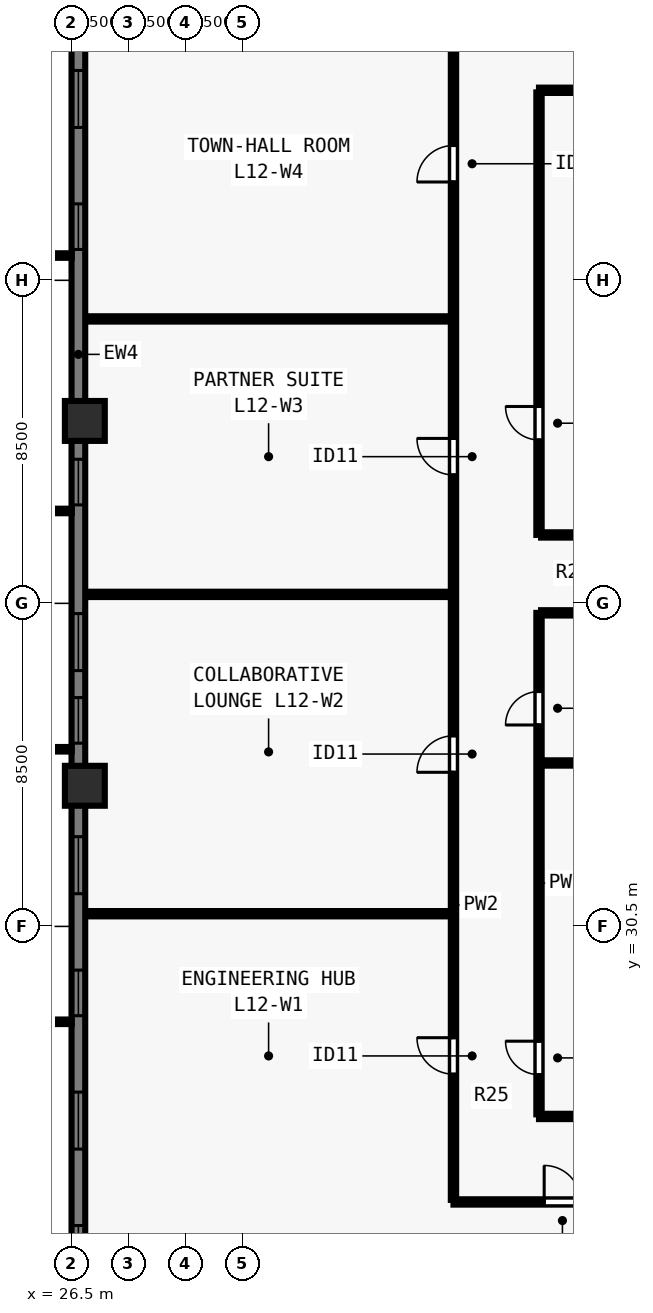
"""IFC4 building model, lengths in metres.
Left out: names, types, materials, properties, quantities, classifications, styles, units other than length and angle.
Written with IfcOpenShell. Run it as: python <this file> out.ifc"""

import sys

from ifc_helpers import new_model, si_unit, direction, frame, frame_2d, origin, origin_2d, place, context, subcontext, project, spatial, rectangle, extrude, element, fill, save


model = new_model("IFC4")
c1 = context("Model", 3, precision=1e-05, world=origin(), true_north=direction((0.0, 1.0)))
c2 = subcontext(c1, "Body", "Model", "MODEL_VIEW")
j1 = project(units=[si_unit("LENGTHUNIT", "METRE"), si_unit("PLANEANGLEUNIT", "RADIAN")], contexts=[c1])
p1 = place(None, origin())
s1 = spatial("IfcSite", under=j1, at=p1, CompositionType="ELEMENT")
p2 = place(p1, origin())
s2 = spatial("IfcBuilding", under=s1, at=p2, CompositionType="ELEMENT")
p3 = place(p2, frame((0.0, 0.0, 48.0)))
s3 = spatial("IfcBuildingStorey", under=s2, at=p3, CompositionType="ELEMENT", Elevation=48.0)
for number, where, z_axis, x_axis in (
    (1, (26.85, 43.8, 0.0), (0.0, 0.0, 1.0), (0.0, 1.0, 0.0)),
    (2, (26.85, 34.2, 0.0), (0.0, 0.0, 1.0), (0.0, 1.0, 0.0)),
):
    element("IfcColumn", number, at=place(p3, frame(where, z_axis=z_axis, x_axis=x_axis)), inside=s3, PredefinedType="COLUMN", context=c2, shape_type="SweptSolid", body=[
        extrude(rectangle(XDim=1.05, YDim=1.05, at=origin_2d()), origin(), (0.0, 0.0, 1.0), 3.5),
    ])
p4 = place(p3, frame((26.68, 16.5, 0.0), z_axis=(0.0, 0.0, 1.0), x_axis=(0.0, 1.0, 0.0)))
e3 = element("IfcWall", 3, at=p4, inside=s3, PredefinedType="SOLIDWALL", context=c2, shape_type="SweptSolid", body=[
    extrude(rectangle(XDim=44.662, YDim=0.36, at=frame_2d((22.331, 0.0))), origin(), (0.0, 0.0, 1.0), 3.28),
])
p5 = place(p4, frame((4.93, 0.0, 0.8)))
e4 = element("IfcOpeningElement", 4, at=p5, cuts=e3, PredefinedType="OPENING", context=c2, shape_type="SweptSolid", body=[
    extrude(rectangle(XDim=1.2, YDim=1.544, at=frame_2d((0.6, 0.772))), frame((0.0, 0.19, 0.0), z_axis=(0.0, -1.0, 0.0), x_axis=(1.0, 0.0, 0.0)), (0.0, 0.0, 1.0), 0.38),
])
p6 = place(p4, frame((8.14, 0.0, 0.8)))
e5 = element("IfcOpeningElement", 5, at=p6, cuts=e3, PredefinedType="OPENING", context=c2, shape_type="SweptSolid", body=[
    extrude(rectangle(XDim=1.5, YDim=1.544, at=frame_2d((0.75, 0.772))), frame((0.0, 0.19, 0.0), z_axis=(0.0, -1.0, 0.0), x_axis=(1.0, 0.0, 0.0)), (0.0, 0.0, 1.0), 0.38),
])
p7 = place(p4, frame((11.65, 0.0, 0.8)))
e6 = element("IfcOpeningElement", 6, at=p7, cuts=e3, PredefinedType="OPENING", context=c2, shape_type="SweptSolid", body=[
    extrude(rectangle(XDim=1.2, YDim=1.544, at=frame_2d((0.6, 0.772))), frame((0.0, 0.19, 0.0), z_axis=(0.0, -1.0, 0.0), x_axis=(1.0, 0.0, 0.0)), (0.0, 0.0, 1.0), 0.38),
])
p8 = place(p4, frame((14.861, 0.0, 0.8)))
e7 = element("IfcOpeningElement", 7, at=p8, cuts=e3, PredefinedType="OPENING", context=c2, shape_type="SweptSolid", body=[
    extrude(rectangle(XDim=1.5, YDim=1.544, at=frame_2d((0.75, 0.772))), frame((0.0, 0.19, 0.0), z_axis=(0.0, -1.0, 0.0), x_axis=(1.0, 0.0, 0.0)), (0.0, 0.0, 1.0), 0.38),
])
p9 = place(p4, frame((18.821, 0.0, 0.8)))
e8 = element("IfcOpeningElement", 8, at=p9, cuts=e3, PredefinedType="OPENING", context=c2, shape_type="SweptSolid", body=[
    extrude(rectangle(XDim=1.2, YDim=1.544, at=frame_2d((0.6, 0.772))), frame((0.0, 0.19, 0.0), z_axis=(0.0, -1.0, 0.0), x_axis=(1.0, 0.0, 0.0)), (0.0, 0.0, 1.0), 0.38),
])
p10 = place(p4, frame((20.731, 0.0, 0.8)))
e9 = element("IfcOpeningElement", 9, at=p10, cuts=e3, PredefinedType="OPENING", context=c2, shape_type="SweptSolid", body=[
    extrude(rectangle(XDim=1.5, YDim=1.544, at=frame_2d((0.75, 0.772))), frame((0.0, 0.19, 0.0), z_axis=(0.0, -1.0, 0.0), x_axis=(1.0, 0.0, 0.0)), (0.0, 0.0, 1.0), 0.38),
])
p11 = place(p4, frame((25.091, 0.0, 0.8)))
e10 = element("IfcOpeningElement", 10, at=p11, cuts=e3, PredefinedType="OPENING", context=c2, shape_type="SweptSolid", body=[
    extrude(rectangle(XDim=1.2, YDim=1.544, at=frame_2d((0.6, 0.772))), frame((0.0, 0.19, 0.0), z_axis=(0.0, -1.0, 0.0), x_axis=(1.0, 0.0, 0.0)), (0.0, 0.0, 1.0), 0.38),
])
p12 = place(p4, frame((31.812, 0.0, 0.8)))
e11 = element("IfcOpeningElement", 11, at=p12, cuts=e3, PredefinedType="OPENING", context=c2, shape_type="SweptSolid", body=[
    extrude(rectangle(XDim=1.2, YDim=1.544, at=frame_2d((0.6, 0.772))), frame((0.0, 0.19, 0.0), z_axis=(0.0, -1.0, 0.0), x_axis=(1.0, 0.0, 0.0)), (0.0, 0.0, 1.0), 0.38),
])
p13 = place(p4, frame((35.022, 0.0, 0.8)))
e12 = element("IfcOpeningElement", 12, at=p13, cuts=e3, PredefinedType="OPENING", context=c2, shape_type="SweptSolid", body=[
    extrude(rectangle(XDim=1.5, YDim=1.544, at=frame_2d((0.75, 0.772))), frame((0.0, 0.19, 0.0), z_axis=(0.0, -1.0, 0.0), x_axis=(1.0, 0.0, 0.0)), (0.0, 0.0, 1.0), 0.38),
])
p14 = place(p4, frame((38.532, 0.0, 0.8)))
e13 = element("IfcOpeningElement", 13, at=p14, cuts=e3, PredefinedType="OPENING", context=c2, shape_type="SweptSolid", body=[
    extrude(rectangle(XDim=1.2, YDim=1.544, at=frame_2d((0.6, 0.772))), frame((0.0, 0.19, 0.0), z_axis=(0.0, -1.0, 0.0), x_axis=(1.0, 0.0, 0.0)), (0.0, 0.0, 1.0), 0.38),
])
p15 = place(p3, frame((36.55, 23.25, 0.0), z_axis=(0.0, 0.0, 1.0), x_axis=(1.0, 0.0, 0.0)))
e14 = element("IfcWall", 14, at=p15, inside=s3, PredefinedType="PARTITIONING", context=c2, shape_type="SweptSolid", body=[
    extrude(rectangle(XDim=30.9, YDim=0.14, at=frame_2d((15.45, 0.0))), origin(), (0.0, 0.0, 1.0), 3.28),
])
p16 = place(p15, frame((2.386, 0.0, 0.0)))
e15 = element("IfcOpeningElement", 15, at=p16, cuts=e14, PredefinedType="OPENING", context=c2, shape_type="SweptSolid", body=[
    extrude(rectangle(XDim=0.96, YDim=2.12, at=frame_2d((0.48, 1.06))), frame((0.0, 0.08, 0.0), z_axis=(0.0, -1.0, 0.0), x_axis=(1.0, 0.0, 0.0)), (0.0, 0.0, 1.0), 0.16),
])
p17 = place(p15, frame((27.066, 0.0, 0.0)))
e16 = element("IfcOpeningElement", 16, at=p17, cuts=e14, PredefinedType="OPENING", context=c2, shape_type="SweptSolid", body=[
    extrude(rectangle(XDim=0.96, YDim=2.12, at=frame_2d((0.48, 1.06))), frame((0.0, 0.08, 0.0), z_axis=(0.0, -1.0, 0.0), x_axis=(1.0, 0.0, 0.0)), (0.0, 0.0, 1.0), 0.16),
])
p18 = place(p3, frame((36.55, 23.305, 0.0), z_axis=(0.0, 0.0, 1.0), x_axis=(0.0, 1.0, 0.0)))
e17 = element("IfcWall", 17, at=p18, inside=s3, PredefinedType="PARTITIONING", context=c2, shape_type="SweptSolid", body=[
    extrude(rectangle(XDim=31.39, YDim=0.14, at=frame_2d((15.695, 0.0))), origin(), (0.0, 0.0, 1.0), 3.28),
])
p19 = place(p18, frame((3.307, 0.0, 0.0)))
e18 = element("IfcOpeningElement", 18, at=p19, cuts=e17, PredefinedType="OPENING", context=c2, shape_type="SweptSolid", body=[
    extrude(rectangle(XDim=0.96, YDim=2.12, at=frame_2d((0.48, 1.06))), frame((0.0, 0.08, 0.0), z_axis=(0.0, -1.0, 0.0), x_axis=(1.0, 0.0, 0.0)), (0.0, 0.0, 1.0), 0.16),
])
p20 = place(p18, frame((11.25, 0.0, 0.0)))
e19 = element("IfcOpeningElement", 19, at=p20, cuts=e17, PredefinedType="OPENING", context=c2, shape_type="SweptSolid", body=[
    extrude(rectangle(XDim=0.96, YDim=2.12, at=frame_2d((0.48, 1.06))), frame((0.0, 0.08, 0.0), z_axis=(0.0, -1.0, 0.0), x_axis=(1.0, 0.0, 0.0)), (0.0, 0.0, 1.0), 0.16),
])
p21 = place(p18, frame((19.075, 0.0, 0.0)))
e20 = element("IfcOpeningElement", 20, at=p21, cuts=e17, PredefinedType="OPENING", context=c2, shape_type="SweptSolid", body=[
    extrude(rectangle(XDim=0.96, YDim=2.12, at=frame_2d((0.48, 1.06))), frame((0.0, 0.08, 0.0), z_axis=(0.0, -1.0, 0.0), x_axis=(1.0, 0.0, 0.0)), (0.0, 0.0, 1.0), 0.16),
])
p22 = place(p18, frame((26.782, 0.0, 0.0)))
e21 = element("IfcOpeningElement", 21, at=p22, cuts=e17, PredefinedType="OPENING", context=c2, shape_type="SweptSolid", body=[
    extrude(rectangle(XDim=0.96, YDim=2.12, at=frame_2d((0.48, 1.06))), frame((0.0, 0.08, 0.0), z_axis=(0.0, -1.0, 0.0), x_axis=(1.0, 0.0, 0.0)), (0.0, 0.0, 1.0), 0.16),
])
p23 = place(p3, frame((38.8, 25.5, 0.0), z_axis=(0.0, 0.0, 1.0), x_axis=(1.0, 0.0, 0.0)))
e22 = element("IfcWall", 22, at=p23, inside=s3, PredefinedType="PARTITIONING", context=c2, shape_type="SweptSolid", body=[
    extrude(rectangle(XDim=26.4, YDim=0.14, at=frame_2d((13.2, 0.0))), origin(), (0.0, 0.0, 1.0), 3.28),
])
p24 = place(p23, frame((1.2, 0.0, 0.0)))
e23 = element("IfcOpeningElement", 23, at=p24, cuts=e22, PredefinedType="OPENING", context=c2, shape_type="SweptSolid", body=[
    extrude(rectangle(XDim=0.88, YDim=2.1, at=frame_2d((0.44, 1.05))), frame((0.0, 0.08, 0.0), z_axis=(0.0, -1.0, 0.0), x_axis=(1.0, 0.0, 0.0)), (0.0, 0.0, 1.0), 0.16),
])
p25 = place(p23, frame((9.7, 0.0, 0.0)))
e24 = element("IfcOpeningElement", 24, at=p25, cuts=e22, PredefinedType="OPENING", context=c2, shape_type="SweptSolid", body=[
    extrude(rectangle(XDim=0.88, YDim=2.1, at=frame_2d((0.44, 1.05))), frame((0.0, 0.08, 0.0), z_axis=(0.0, -1.0, 0.0), x_axis=(1.0, 0.0, 0.0)), (0.0, 0.0, 1.0), 0.16),
])
p26 = place(p23, frame((20.2, 0.0, 0.0)))
e25 = element("IfcOpeningElement", 25, at=p26, cuts=e22, PredefinedType="OPENING", context=c2, shape_type="SweptSolid", body=[
    extrude(rectangle(XDim=0.88, YDim=2.1, at=frame_2d((0.44, 1.05))), frame((0.0, 0.08, 0.0), z_axis=(0.0, -1.0, 0.0), x_axis=(1.0, 0.0, 0.0)), (0.0, 0.0, 1.0), 0.16),
])
p27 = place(p3, frame((38.8, 52.5, 0.0), z_axis=(0.0, 0.0, 1.0), x_axis=(1.0, 0.0, 0.0)))
e26 = element("IfcWall", 26, at=p27, inside=s3, PredefinedType="PARTITIONING", context=c2, shape_type="SweptSolid", body=[
    extrude(rectangle(XDim=26.4, YDim=0.14, at=frame_2d((13.2, 0.0))), origin(), (0.0, 0.0, 1.0), 3.28),
])
p28 = place(p27, frame((2.2, 0.0, 0.0)))
e27 = element("IfcOpeningElement", 27, at=p28, cuts=e26, PredefinedType="OPENING", context=c2, shape_type="SweptSolid", body=[
    extrude(rectangle(XDim=0.88, YDim=2.1, at=frame_2d((0.44, 1.05))), frame((0.0, 0.08, 0.0), z_axis=(0.0, -1.0, 0.0), x_axis=(1.0, 0.0, 0.0)), (0.0, 0.0, 1.0), 0.16),
])
p29 = place(p27, frame((13.7, 0.0, 0.0)))
e28 = element("IfcOpeningElement", 28, at=p29, cuts=e26, PredefinedType="OPENING", context=c2, shape_type="SweptSolid", body=[
    extrude(rectangle(XDim=0.88, YDim=2.1, at=frame_2d((0.44, 1.05))), frame((0.0, 0.08, 0.0), z_axis=(0.0, -1.0, 0.0), x_axis=(1.0, 0.0, 0.0)), (0.0, 0.0, 1.0), 0.16),
])
p30 = place(p27, frame((23.2, 0.0, 0.0)))
e29 = element("IfcOpeningElement", 29, at=p30, cuts=e26, PredefinedType="OPENING", context=c2, shape_type="SweptSolid", body=[
    extrude(rectangle(XDim=0.88, YDim=2.1, at=frame_2d((0.44, 1.05))), frame((0.0, 0.08, 0.0), z_axis=(0.0, -1.0, 0.0), x_axis=(1.0, 0.0, 0.0)), (0.0, 0.0, 1.0), 0.16),
])
p31 = place(p3, frame((38.8, 25.555, 0.0), z_axis=(0.0, 0.0, 1.0), x_axis=(0.0, 1.0, 0.0)))
e30 = element("IfcWall", 30, at=p31, inside=s3, PredefinedType="PARTITIONING", context=c2, shape_type="SweptSolid", body=[
    extrude(rectangle(XDim=13.195, YDim=0.14, at=frame_2d((6.598, 0.0))), origin(), (0.0, 0.0, 1.0), 3.28),
])
p32 = place(p31, frame((1.045, 0.0, 0.0)))
e31 = element("IfcOpeningElement", 31, at=p32, cuts=e30, PredefinedType="OPENING", context=c2, shape_type="SweptSolid", body=[
    extrude(rectangle(XDim=0.88, YDim=2.1, at=frame_2d((0.44, 1.05))), frame((0.0, 0.08, 0.0), z_axis=(0.0, -1.0, 0.0), x_axis=(1.0, 0.0, 0.0)), (0.0, 0.0, 1.0), 0.16),
])
p33 = place(p31, frame((10.245, 0.0, 0.0)))
e32 = element("IfcOpeningElement", 32, at=p33, cuts=e30, PredefinedType="OPENING", context=c2, shape_type="SweptSolid", body=[
    extrude(rectangle(XDim=0.88, YDim=2.1, at=frame_2d((0.44, 1.05))), frame((0.0, 0.08, 0.0), z_axis=(0.0, -1.0, 0.0), x_axis=(1.0, 0.0, 0.0)), (0.0, 0.0, 1.0), 0.16),
])
p34 = place(p3, frame((38.8, 40.8, 0.0), z_axis=(0.0, 0.0, 1.0), x_axis=(0.0, 1.0, 0.0)))
e33 = element("IfcWall", 33, at=p34, inside=s3, PredefinedType="PARTITIONING", context=c2, shape_type="SweptSolid", body=[
    extrude(rectangle(XDim=11.645, YDim=0.14, at=frame_2d((5.823, 0.0))), origin(), (0.0, 0.0, 1.0), 3.28),
])
p35 = place(p34, frame((2.5, 0.0, 0.0)))
e34 = element("IfcOpeningElement", 34, at=p35, cuts=e33, PredefinedType="OPENING", context=c2, shape_type="SweptSolid", body=[
    extrude(rectangle(XDim=0.88, YDim=2.1, at=frame_2d((0.44, 1.05))), frame((0.0, 0.08, 0.0), z_axis=(0.0, -1.0, 0.0), x_axis=(1.0, 0.0, 0.0)), (0.0, 0.0, 1.0), 0.16),
])
for number, where, z_axis, x_axis in (
    (35, (38.855, 38.75, 0.0), (0.0, 0.0, 1.0), (1.0, 0.0, 0.0)),
    (36, (38.855, 40.8, 0.0), (0.0, 0.0, 1.0), (1.0, 0.0, 0.0)),
    (37, (38.855, 34.8, 0.0), (0.0, 0.0, 1.0), (1.0, 0.0, 0.0)),
):
    element("IfcWall", number, at=place(p3, frame(where, z_axis=z_axis, x_axis=x_axis)), inside=s3, PredefinedType="PARTITIONING", context=c2, shape_type="SweptSolid", body=[
        extrude(rectangle(XDim=4.385, YDim=0.14, at=frame_2d((2.192, 0.0))), origin(), (0.0, 0.0, 1.0), 3.28),
    ])
p36 = place(p3, frame((26.92, 30.834, 0.0), z_axis=(0.0, 0.0, 1.0), x_axis=(1.0, 0.0, 0.0)))
e38 = element("IfcWall", 38, at=p36, inside=s3, PredefinedType="PARTITIONING", context=c2, shape_type="SweptSolid", body=[
    extrude(rectangle(XDim=9.53, YDim=0.14, at=frame_2d((4.765, 0.0))), origin(), (0.0, 0.0, 1.0), 3.28),
])
p37 = place(p3, frame((26.92, 39.236, 0.0), z_axis=(0.0, 0.0, 1.0), x_axis=(1.0, 0.0, 0.0)))
e39 = element("IfcWall", 39, at=p37, inside=s3, PredefinedType="PARTITIONING", context=c2, shape_type="SweptSolid", body=[
    extrude(rectangle(XDim=9.53, YDim=0.14, at=frame_2d((4.765, 0.0))), origin(), (0.0, 0.0, 1.0), 2.849),
])
p38 = place(p3, frame((26.92, 46.484, 0.0), z_axis=(0.0, 0.0, 1.0), x_axis=(1.0, 0.0, 0.0)))
e40 = element("IfcWall", 40, at=p38, inside=s3, PredefinedType="PARTITIONING", context=c2, shape_type="SweptSolid", body=[
    extrude(rectangle(XDim=9.53, YDim=0.14, at=frame_2d((4.765, 0.0))), origin(), (0.0, 0.0, 1.0), 3.28),
])
p39 = place(p5, origin())
e41 = element("IfcWindow", 41, at=p39, inside=s3, PartitioningType="SINGLE_PANEL", PredefinedType="WINDOW", context=c2, shape_type="SweptSolid", body=[
    extrude(rectangle(XDim=1.2, YDim=1.544, at=frame_2d((0.6, 0.772))), frame((0.0, -0.05, 0.0), z_axis=(0.0, -1.0, 0.0), x_axis=(1.0, 0.0, 0.0)), (0.0, 0.0, 1.0), 0.06),
])
fill(e4, e41)
p40 = place(p6, origin())
e42 = element("IfcWindow", 42, at=p40, inside=s3, PartitioningType="SINGLE_PANEL", PredefinedType="WINDOW", context=c2, shape_type="SweptSolid", body=[
    extrude(rectangle(XDim=1.5, YDim=1.544, at=frame_2d((0.75, 0.772))), frame((0.0, -0.05, 0.0), z_axis=(0.0, -1.0, 0.0), x_axis=(1.0, 0.0, 0.0)), (0.0, 0.0, 1.0), 0.06),
])
fill(e5, e42)
p41 = place(p7, origin())
e43 = element("IfcWindow", 43, at=p41, inside=s3, PartitioningType="SINGLE_PANEL", PredefinedType="WINDOW", context=c2, shape_type="SweptSolid", body=[
    extrude(rectangle(XDim=1.2, YDim=1.544, at=frame_2d((0.6, 0.772))), frame((0.0, -0.05, 0.0), z_axis=(0.0, -1.0, 0.0), x_axis=(1.0, 0.0, 0.0)), (0.0, 0.0, 1.0), 0.06),
])
fill(e6, e43)
p42 = place(p8, origin())
e44 = element("IfcWindow", 44, at=p42, inside=s3, PartitioningType="SINGLE_PANEL", PredefinedType="WINDOW", context=c2, shape_type="SweptSolid", body=[
    extrude(rectangle(XDim=1.5, YDim=1.544, at=frame_2d((0.75, 0.772))), frame((0.0, -0.05, 0.0), z_axis=(0.0, -1.0, 0.0), x_axis=(1.0, 0.0, 0.0)), (0.0, 0.0, 1.0), 0.06),
])
fill(e7, e44)
p43 = place(p9, origin())
e45 = element("IfcWindow", 45, at=p43, inside=s3, PartitioningType="SINGLE_PANEL", PredefinedType="WINDOW", context=c2, shape_type="SweptSolid", body=[
    extrude(rectangle(XDim=1.2, YDim=1.544, at=frame_2d((0.6, 0.772))), frame((0.0, -0.05, 0.0), z_axis=(0.0, -1.0, 0.0), x_axis=(1.0, 0.0, 0.0)), (0.0, 0.0, 1.0), 0.06),
])
fill(e8, e45)
p44 = place(p10, origin())
e46 = element("IfcWindow", 46, at=p44, inside=s3, PartitioningType="SINGLE_PANEL", PredefinedType="WINDOW", context=c2, shape_type="SweptSolid", body=[
    extrude(rectangle(XDim=1.5, YDim=1.544, at=frame_2d((0.75, 0.772))), frame((0.0, -0.05, 0.0), z_axis=(0.0, -1.0, 0.0), x_axis=(1.0, 0.0, 0.0)), (0.0, 0.0, 1.0), 0.06),
])
fill(e9, e46)
p45 = place(p11, origin())
e47 = element("IfcWindow", 47, at=p45, inside=s3, PartitioningType="SINGLE_PANEL", PredefinedType="WINDOW", context=c2, shape_type="SweptSolid", body=[
    extrude(rectangle(XDim=1.2, YDim=1.544, at=frame_2d((0.6, 0.772))), frame((0.0, -0.05, 0.0), z_axis=(0.0, -1.0, 0.0), x_axis=(1.0, 0.0, 0.0)), (0.0, 0.0, 1.0), 0.06),
])
fill(e10, e47)
p46 = place(p12, origin())
e48 = element("IfcWindow", 48, at=p46, inside=s3, PartitioningType="SINGLE_PANEL", PredefinedType="WINDOW", context=c2, shape_type="SweptSolid", body=[
    extrude(rectangle(XDim=1.2, YDim=1.544, at=frame_2d((0.6, 0.772))), frame((0.0, -0.05, 0.0), z_axis=(0.0, -1.0, 0.0), x_axis=(1.0, 0.0, 0.0)), (0.0, 0.0, 1.0), 0.06),
])
fill(e11, e48)
p47 = place(p13, origin())
e49 = element("IfcWindow", 49, at=p47, inside=s3, PartitioningType="SINGLE_PANEL", PredefinedType="WINDOW", context=c2, shape_type="SweptSolid", body=[
    extrude(rectangle(XDim=1.5, YDim=1.544, at=frame_2d((0.75, 0.772))), frame((0.0, -0.05, 0.0), z_axis=(0.0, -1.0, 0.0), x_axis=(1.0, 0.0, 0.0)), (0.0, 0.0, 1.0), 0.06),
])
fill(e12, e49)
p48 = place(p32, origin())
e50 = element("IfcDoor", 50, at=p48, inside=s3, OperationType="SINGLE_SWING_RIGHT", PredefinedType="DOOR", context=c2, shape_type="SweptSolid", body=[
    extrude(rectangle(XDim=0.88, YDim=2.1, at=frame_2d((0.44, 1.05))), frame((0.0, 0.025, 0.0), z_axis=(0.0, -1.0, 0.0), x_axis=(1.0, 0.0, 0.0)), (0.0, 0.0, 1.0), 0.05),
])
fill(e31, e50)
p49 = place(p33, origin())
e51 = element("IfcDoor", 51, at=p49, inside=s3, OperationType="SINGLE_SWING_LEFT", PredefinedType="DOOR", context=c2, shape_type="SweptSolid", body=[
    extrude(rectangle(XDim=0.88, YDim=2.1, at=frame_2d((0.44, 1.05))), frame((0.0, 0.025, 0.0), z_axis=(0.0, -1.0, 0.0), x_axis=(1.0, 0.0, 0.0)), (0.0, 0.0, 1.0), 0.05),
])
fill(e32, e51)
p50 = place(p35, origin())
e52 = element("IfcDoor", 52, at=p50, inside=s3, OperationType="SINGLE_SWING_RIGHT", PredefinedType="DOOR", context=c2, shape_type="SweptSolid", body=[
    extrude(rectangle(XDim=0.88, YDim=2.1, at=frame_2d((0.44, 1.05))), frame((0.0, 0.025, 0.0), z_axis=(0.0, -1.0, 0.0), x_axis=(1.0, 0.0, 0.0)), (0.0, 0.0, 1.0), 0.05),
])
fill(e34, e52)
p51 = place(p16, origin())
e53 = element("IfcDoor", 53, at=p51, inside=s3, OperationType="SINGLE_SWING_LEFT", PredefinedType="DOOR", context=c2, shape_type="SweptSolid", body=[
    extrude(rectangle(XDim=0.96, YDim=2.12, at=frame_2d((0.48, 1.06))), frame((0.0, 0.025, 0.0), z_axis=(0.0, -1.0, 0.0), x_axis=(1.0, 0.0, 0.0)), (0.0, 0.0, 1.0), 0.05),
])
fill(e15, e53)
p52 = place(p19, origin())
e54 = element("IfcDoor", 54, at=p52, inside=s3, OperationType="SINGLE_SWING_RIGHT", PredefinedType="DOOR", context=c2, shape_type="SweptSolid", body=[
    extrude(rectangle(XDim=0.96, YDim=2.12, at=frame_2d((0.48, 1.06))), frame((0.0, 0.025, 0.0), z_axis=(0.0, -1.0, 0.0), x_axis=(1.0, 0.0, 0.0)), (0.0, 0.0, 1.0), 0.05),
])
fill(e18, e54)
p53 = place(p20, origin())
e55 = element("IfcDoor", 55, at=p53, inside=s3, OperationType="SINGLE_SWING_LEFT", PredefinedType="DOOR", context=c2, shape_type="SweptSolid", body=[
    extrude(rectangle(XDim=0.96, YDim=2.12, at=frame_2d((0.48, 1.06))), frame((0.0, 0.025, 0.0), z_axis=(0.0, -1.0, 0.0), x_axis=(1.0, 0.0, 0.0)), (0.0, 0.0, 1.0), 0.05),
])
fill(e19, e55)
p54 = place(p21, origin())
e56 = element("IfcDoor", 56, at=p54, inside=s3, OperationType="SINGLE_SWING_RIGHT", PredefinedType="DOOR", context=c2, shape_type="SweptSolid", body=[
    extrude(rectangle(XDim=0.96, YDim=2.12, at=frame_2d((0.48, 1.06))), frame((0.0, 0.025, 0.0), z_axis=(0.0, -1.0, 0.0), x_axis=(1.0, 0.0, 0.0)), (0.0, 0.0, 1.0), 0.05),
])
fill(e20, e56)
p55 = place(p22, origin())
e57 = element("IfcDoor", 57, at=p55, inside=s3, OperationType="SINGLE_SWING_LEFT", PredefinedType="DOOR", context=c2, shape_type="SweptSolid", body=[
    extrude(rectangle(XDim=0.96, YDim=2.12, at=frame_2d((0.48, 1.06))), frame((0.0, 0.025, 0.0), z_axis=(0.0, -1.0, 0.0), x_axis=(1.0, 0.0, 0.0)), (0.0, 0.0, 1.0), 0.05),
])
fill(e21, e57)
save(model, sys.argv[1])
